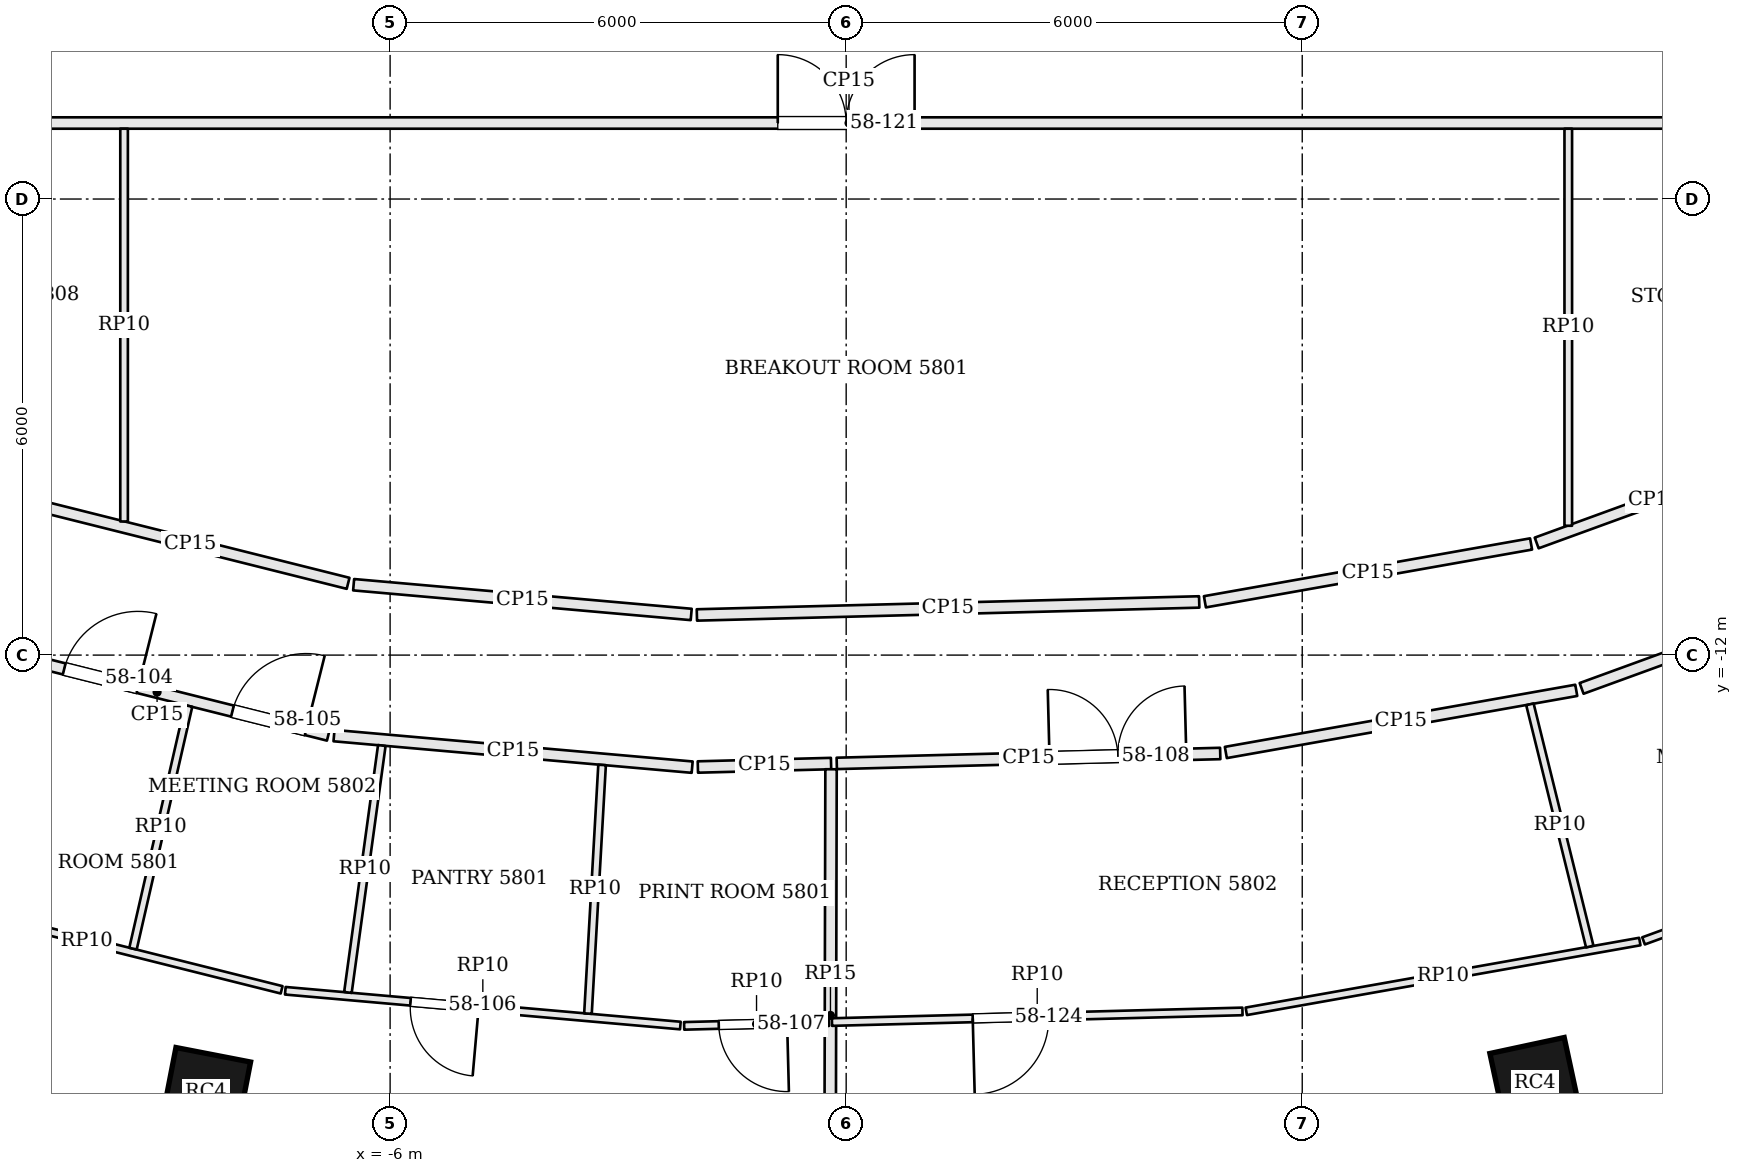
"""IFC4 building model, lengths in metres.
Left out: names, types, materials, properties, quantities, classifications, styles, units other than length and angle.
Written with IfcOpenShell. Run it as: python <this file> out.ifc"""

import sys

from ifc_helpers import new_model, si_unit, direction, frame, frame_2d, origin, origin_2d, place, context, subcontext, project, spatial, rectangle, extrude, element, fill, save


model = new_model("IFC4")
c1 = context("Model", 3, precision=1e-05, world=origin(), true_north=direction((0.0, 1.0)))
c2 = subcontext(c1, "Body", "Model", "MODEL_VIEW")
j1 = project(units=[si_unit("LENGTHUNIT", "METRE"), si_unit("PLANEANGLEUNIT", "RADIAN")], contexts=[c1])
p1 = place(None, origin())
s1 = spatial("IfcSite", under=j1, at=p1, CompositionType="ELEMENT")
p2 = place(p1, origin())
s2 = spatial("IfcBuilding", under=s1, at=p2, CompositionType="ELEMENT")
p3 = place(p2, frame((0.0, 0.0, 237.0)))
s3 = spatial("IfcBuildingStorey", under=s2, at=p3, CompositionType="ELEMENT", Elevation=237.0)
for number, where, z_axis, x_axis in (
    (1, (-8.422, -17.749, 0.0), (0.0, 0.0, 1.0), (0.982, -0.191, 0.0)),
    (2, (9.063, -17.625, 0.0), (0.0, 0.0, 1.0), (0.978, 0.21, 0.0)),
):
    element("IfcColumn", number, at=place(p3, frame(where, z_axis=z_axis, x_axis=x_axis)), inside=s3, PredefinedType="COLUMN", context=c2, shape_type="SweptSolid", body=[
        extrude(rectangle(XDim=1.0, YDim=1.0, at=origin_2d()), origin(), (0.0, 0.0, 1.0), 3.9),
    ])
p4 = place(p3, frame((-11.319, -11.923, 0.0), z_axis=(0.0, 0.0, 1.0), x_axis=(0.969990815038, -0.243141561114, 0.0)))
e3 = element("IfcWall", 3, at=p4, inside=s3, PredefinedType="PARTITIONING", context=c2, shape_type="SweptSolid", body=[
    extrude(rectangle(XDim=4.645, YDim=0.15, at=frame_2d((2.323, 0.0))), origin(), (0.0, 0.0, 1.0), 3.084),
])
p5 = place(p4, frame((1.063, 0.0, 0.0)))
e4 = element("IfcOpeningElement", 4, at=p5, cuts=e3, PredefinedType="OPENING", context=c2, shape_type="SweptSolid", body=[
    extrude(rectangle(XDim=1.0, YDim=2.4, at=frame_2d((0.5, 1.2))), frame((0.0, 0.085, 0.0), z_axis=(0.0, -1.0, 0.0), x_axis=(1.0, 0.0, 0.0)), (0.0, 0.0, 1.0), 0.17),
])
p6 = place(p4, frame((3.345, 0.0, 0.0)))
e5 = element("IfcOpeningElement", 5, at=p6, cuts=e3, PredefinedType="OPENING", context=c2, shape_type="SweptSolid", body=[
    extrude(rectangle(XDim=1.0, YDim=2.4, at=frame_2d((0.5, 1.2))), frame((0.0, 0.085, 0.0), z_axis=(0.0, -1.0, 0.0), x_axis=(1.0, 0.0, 0.0)), (0.0, 0.0, 1.0), 0.17),
])
p7 = place(p3, frame((-6.738, -13.059, 0.0), z_axis=(0.0, 0.0, 1.0), x_axis=(0.996143527037, -0.087738666181, 0.0)))
e6 = element("IfcWall", 6, at=p7, inside=s3, PredefinedType="PARTITIONING", context=c2, shape_type="SweptSolid", body=[
    extrude(rectangle(XDim=4.73, YDim=0.15, at=frame_2d((2.365, 0.0))), origin(), (0.0, 0.0, 1.0), 3.084),
])
p8 = place(p3, frame((-1.951, -13.472, 0.0), z_axis=(0.0, 0.0, 1.0), x_axis=(0.999660729369, 0.026046615075, 0.0)))
e7 = element("IfcWall", 7, at=p8, inside=s3, PredefinedType="PARTITIONING", context=c2, shape_type="SweptSolid", body=[
    extrude(rectangle(XDim=1.753, YDim=0.15, at=frame_2d((0.876, 0.0))), origin(), (0.0, 0.0, 1.0), 3.084),
])
p9 = place(p3, frame((-0.214, -19.979, 0.0), z_axis=(0.0, 0.0, 1.0), x_axis=(0.002336970626, 0.99999726928, 0.0)))
e8 = element("IfcWall", 8, at=p9, inside=s3, PredefinedType="PARTITIONING", context=c2, shape_type="SweptSolid", body=[
    extrude(rectangle(XDim=6.477, YDim=0.15, at=frame_2d((3.239, 0.0))), origin(), (0.0, 0.0, 1.0), 3.184),
])
p10 = place(p3, frame((-0.124, -13.425, 0.0), z_axis=(0.0, 0.0, 1.0), x_axis=(0.999665011025, 0.025881764465, 0.0)))
e9 = element("IfcWall", 9, at=p10, inside=s3, PredefinedType="PARTITIONING", context=c2, shape_type="SweptSolid", body=[
    extrude(rectangle(XDim=5.047, YDim=0.15, at=frame_2d((2.523, 0.0))), origin(), (0.0, 0.0, 1.0), 3.084),
])
p11 = place(p10, frame((2.8, 0.0, 0.0)))
e10 = element("IfcOpeningElement", 10, at=p11, cuts=e9, PredefinedType="OPENING", context=c2, shape_type="SweptSolid", body=[
    extrude(rectangle(XDim=1.8, YDim=2.1, at=frame_2d((0.9, 1.05))), frame((0.0, 0.085, 0.0), z_axis=(0.0, -1.0, 0.0), x_axis=(1.0, 0.0, 0.0)), (0.0, 0.0, 1.0), 0.17),
])
p12 = place(p3, frame((4.995, -13.281, 0.0), z_axis=(0.0, 0.0, 1.0), x_axis=(0.98463411377, 0.174630071865, 0.0)))
e11 = element("IfcWall", 11, at=p12, inside=s3, PredefinedType="PARTITIONING", context=c2, shape_type="SweptSolid", body=[
    extrude(rectangle(XDim=4.682, YDim=0.15, at=frame_2d((2.341, 0.0))), origin(), (0.0, 0.0, 1.0), 3.084),
])
p13 = place(p3, frame((9.676, -12.438, 0.0), z_axis=(0.0, 0.0, 1.0), x_axis=(0.939640289748, 0.342163887461, 0.0)))
e12 = element("IfcWall", 12, at=p13, inside=s3, PredefinedType="PARTITIONING", context=c2, shape_type="SweptSolid", body=[
    extrude(rectangle(XDim=3.68, YDim=0.15, at=frame_2d((1.84, 0.0))), origin(), (0.0, 0.0, 1.0), 3.084),
])
p14 = place(p13, frame((1.349, 0.0, 0.0)))
e13 = element("IfcOpeningElement", 13, at=p14, cuts=e12, PredefinedType="OPENING", context=c2, shape_type="SweptSolid", body=[
    extrude(rectangle(XDim=1.0, YDim=2.4, at=frame_2d((0.5, 1.2))), frame((0.0, 0.085, 0.0), z_axis=(0.0, -1.0, 0.0), x_axis=(1.0, 0.0, 0.0)), (0.0, 0.0, 1.0), 0.17),
])
p15 = place(p3, frame((12.178, -9.398, 0.0), z_axis=(0.0, 0.0, 1.0), x_axis=(-0.939609240084, -0.342249143093, 0.0)))
e14 = element("IfcWall", 14, at=p15, inside=s3, PredefinedType="PARTITIONING", context=c2, shape_type="SweptSolid", body=[
    extrude(rectangle(XDim=3.292, YDim=0.15, at=frame_2d((1.646, 0.0))), origin(), (0.0, 0.0, 1.0), 3.084),
])
p16 = place(p3, frame((9.01, -10.538, 0.0), z_axis=(0.0, 0.0, 1.0), x_axis=(-0.984645638575, -0.174565077936, 0.0)))
e15 = element("IfcWall", 15, at=p16, inside=s3, PredefinedType="PARTITIONING", context=c2, shape_type="SweptSolid", body=[
    extrude(rectangle(XDim=4.358, YDim=0.15, at=frame_2d((2.179, 0.0))), origin(), (0.0, 0.0, 1.0), 3.084),
])
p17 = place(p3, frame((4.645, -11.301, 0.0), z_axis=(0.0, 0.0, 1.0), x_axis=(-0.9996648469, -0.02588810291, 0.0)))
e16 = element("IfcWall", 16, at=p17, inside=s3, PredefinedType="PARTITIONING", context=c2, shape_type="SweptSolid", body=[
    extrude(rectangle(XDim=6.611, YDim=0.15, at=frame_2d((3.305, 0.0))), origin(), (0.0, 0.0, 1.0), 3.084),
])
p18 = place(p3, frame((-2.039, -11.465, 0.0), z_axis=(0.0, 0.0, 1.0), x_axis=(-0.996139855484, 0.087780341286, 0.0)))
e17 = element("IfcWall", 17, at=p18, inside=s3, PredefinedType="PARTITIONING", context=c2, shape_type="SweptSolid", body=[
    extrude(rectangle(XDim=4.458, YDim=0.15, at=frame_2d((2.229, 0.0))), origin(), (0.0, 0.0, 1.0), 3.084),
])
p19 = place(p3, frame((-6.553, -11.056, 0.0), z_axis=(0.0, 0.0, 1.0), x_axis=(-0.970004917182, 0.243085294995, 0.0)))
e18 = element("IfcWall", 18, at=p19, inside=s3, PredefinedType="PARTITIONING", context=c2, shape_type="SweptSolid", body=[
    extrude(rectangle(XDim=4.284, YDim=0.15, at=frame_2d((2.142, 0.0))), origin(), (0.0, 0.0, 1.0), 3.084),
])
p20 = place(p3, frame((-14.925, -5.0, 0.0), z_axis=(0.0, 0.0, 1.0), x_axis=(1.0, 0.0, 0.0)))
e19 = element("IfcWall", 19, at=p20, inside=s3, PredefinedType="PARTITIONING", context=c2, shape_type="SweptSolid", body=[
    extrude(rectangle(XDim=29.925, YDim=0.15, at=frame_2d((14.962, 0.0))), origin(), (0.0, 0.0, 1.0), 3.084),
])
p21 = place(p20, frame((2.175, 0.0, 0.0)))
e20 = element("IfcOpeningElement", 20, at=p21, cuts=e19, PredefinedType="OPENING", context=c2, shape_type="SweptSolid", body=[
    extrude(rectangle(XDim=1.0, YDim=2.4, at=frame_2d((0.5, 1.2))), frame((0.0, 0.085, 0.0), z_axis=(0.0, -1.0, 0.0), x_axis=(1.0, 0.0, 0.0)), (0.0, 0.0, 1.0), 0.17),
])
p22 = place(p20, frame((14.025, 0.0, 0.0)))
e21 = element("IfcOpeningElement", 21, at=p22, cuts=e19, PredefinedType="OPENING", context=c2, shape_type="SweptSolid", body=[
    extrude(rectangle(XDim=1.8, YDim=2.1, at=frame_2d((0.9, 1.05))), frame((0.0, 0.085, 0.0), z_axis=(0.0, -1.0, 0.0), x_axis=(1.0, 0.0, 0.0)), (0.0, 0.0, 1.0), 0.17),
])
p23 = place(p20, frame((26.825, 0.0, 0.0)))
e22 = element("IfcOpeningElement", 22, at=p23, cuts=e19, PredefinedType="OPENING", context=c2, shape_type="SweptSolid", body=[
    extrude(rectangle(XDim=0.7, YDim=2.1, at=frame_2d((0.35, 1.05))), frame((0.0, 0.085, 0.0), z_axis=(0.0, -1.0, 0.0), x_axis=(1.0, 0.0, 0.0)), (0.0, 0.0, 1.0), 0.17),
])
p24 = place(p3, frame((-0.227, -16.829, 0.0), z_axis=(0.0, 0.0, 1.0), x_axis=(-0.99966500172, -0.025882123859, 0.0)))
e23 = element("IfcWall", 23, at=p24, inside=s3, PredefinedType="PARTITIONING", context=c2, shape_type="SweptSolid", body=[
    extrude(rectangle(XDim=1.906, YDim=0.1, at=frame_2d((0.953, 0.0))), origin(), (0.0, 0.0, 1.0), 3.084),
])
p25 = place(p24, frame((0.55, 0.0, 0.0)))
e24 = element("IfcOpeningElement", 24, at=p25, cuts=e23, PredefinedType="OPENING", context=c2, shape_type="SweptSolid", body=[
    extrude(rectangle(XDim=0.9, YDim=2.1, at=frame_2d((0.45, 1.05))), frame((0.0, 0.06, 0.0), z_axis=(0.0, -1.0, 0.0), x_axis=(1.0, 0.0, 0.0)), (0.0, 0.0, 1.0), 0.12),
])
p26 = place(p3, frame((-2.181, -16.874, 0.0), z_axis=(0.0, 0.0, 1.0), x_axis=(-0.996143934904, 0.087734035321, 0.0)))
e25 = element("IfcWall", 25, at=p26, inside=s3, PredefinedType="PARTITIONING", context=c2, shape_type="SweptSolid", body=[
    extrude(rectangle(XDim=5.218, YDim=0.1, at=frame_2d((2.609, 0.0))), origin(), (0.0, 0.0, 1.0), 3.084),
])
p27 = place(p26, frame((2.664, 0.0, 0.0)))
e26 = element("IfcOpeningElement", 26, at=p27, cuts=e25, PredefinedType="OPENING", context=c2, shape_type="SweptSolid", body=[
    extrude(rectangle(XDim=0.9, YDim=2.1, at=frame_2d((0.45, 1.05))), frame((0.0, 0.06, 0.0), z_axis=(0.0, -1.0, 0.0), x_axis=(1.0, 0.0, 0.0)), (0.0, 0.0, 1.0), 0.12),
])
p28 = place(p3, frame((-7.427, -16.404, 0.0), z_axis=(0.0, 0.0, 1.0), x_axis=(-0.970009158253, 0.243068370845, 0.0)))
e27 = element("IfcWall", 27, at=p28, inside=s3, PredefinedType="PARTITIONING", context=c2, shape_type="SweptSolid", body=[
    extrude(rectangle(XDim=5.283, YDim=0.1, at=frame_2d((2.642, 0.0))), origin(), (0.0, 0.0, 1.0), 3.084),
])
p29 = place(p3, frame((-8.652, -12.669, 0.0), z_axis=(0.0, 0.0, 1.0), x_axis=(-0.223144536662, -0.974785369073, 0.0)))
e28 = element("IfcWall", 28, at=p29, inside=s3, PredefinedType="PARTITIONING", context=c2, shape_type="SweptSolid", body=[
    extrude(rectangle(XDim=3.276, YDim=0.1, at=frame_2d((1.638, 0.0))), origin(), (0.0, 0.0, 1.0), 3.084),
])
p30 = place(p3, frame((-6.109, -13.19, 0.0), z_axis=(0.0, 0.0, 1.0), x_axis=(-0.135957093791, -0.990714726169, 0.0)))
e29 = element("IfcWall", 29, at=p30, inside=s3, PredefinedType="PARTITIONING", context=c2, shape_type="SweptSolid", body=[
    extrude(rectangle(XDim=3.279, YDim=0.1, at=frame_2d((1.64, 0.0))), origin(), (0.0, 0.0, 1.0), 3.084),
])
p31 = place(p3, frame((-3.211, -13.445, 0.0), z_axis=(0.0, 0.0, 1.0), x_axis=(-0.056703901856, -0.99839103938, 0.0)))
e30 = element("IfcWall", 30, at=p31, inside=s3, PredefinedType="PARTITIONING", context=c2, shape_type="SweptSolid", body=[
    extrude(rectangle(XDim=3.277, YDim=0.1, at=frame_2d((1.638, 0.0))), origin(), (0.0, 0.0, 1.0), 3.084),
])
p32 = place(p3, frame((14.59, -14.267, 0.0), z_axis=(0.0, 0.0, 1.0), x_axis=(-0.939623405418, -0.342210251148, 0.0)))
e31 = element("IfcWall", 31, at=p32, inside=s3, PredefinedType="PARTITIONING", context=c2, shape_type="SweptSolid", body=[
    extrude(rectangle(XDim=4.363, YDim=0.1, at=frame_2d((2.182, 0.0))), origin(), (0.0, 0.0, 1.0), 3.084),
])
p33 = place(p3, frame((10.441, -15.769, 0.0), z_axis=(0.0, 0.0, 1.0), x_axis=(-0.984642067447, -0.174585219919, 0.0)))
e32 = element("IfcWall", 32, at=p33, inside=s3, PredefinedType="PARTITIONING", context=c2, shape_type="SweptSolid", body=[
    extrude(rectangle(XDim=5.258, YDim=0.1, at=frame_2d((2.629, 0.0))), origin(), (0.0, 0.0, 1.0), 3.084),
])
p34 = place(p3, frame((5.214, -16.688, 0.0), z_axis=(0.0, 0.0, 1.0), x_axis=(-0.999664716631, -0.025893132747, 0.0)))
e33 = element("IfcWall", 33, at=p34, inside=s3, PredefinedType="PARTITIONING", context=c2, shape_type="SweptSolid", body=[
    extrude(rectangle(XDim=5.403, YDim=0.1, at=frame_2d((2.701, 0.0))), origin(), (0.0, 0.0, 1.0), 3.084),
])
p35 = place(p34, frame((2.55, 0.0, 0.0)))
e34 = element("IfcOpeningElement", 34, at=p35, cuts=e33, PredefinedType="OPENING", context=c2, shape_type="SweptSolid", body=[
    extrude(rectangle(XDim=1.0, YDim=2.1, at=frame_2d((0.5, 1.05))), frame((0.0, 0.06, 0.0), z_axis=(0.0, -1.0, 0.0), x_axis=(1.0, 0.0, 0.0)), (0.0, 0.0, 1.0), 0.12),
])
p36 = place(p3, frame((8.995, -12.648, 0.0), z_axis=(0.0, 0.0, 1.0), x_axis=(0.239839908092, -0.970812452787, 0.0)))
e35 = element("IfcWall", 35, at=p36, inside=s3, PredefinedType="PARTITIONING", context=c2, shape_type="SweptSolid", body=[
    extrude(rectangle(XDim=3.283, YDim=0.1, at=frame_2d((1.641, 0.0))), origin(), (0.0, 0.0, 1.0), 3.084),
])
p37 = place(p3, frame((-9.5, -10.242, 0.0), z_axis=(0.0, 0.0, 1.0), x_axis=(0.0, 1.0, 0.0)))
e36 = element("IfcWall", 36, at=p37, inside=s3, PredefinedType="PARTITIONING", context=c2, shape_type="SweptSolid", body=[
    extrude(rectangle(XDim=5.167, YDim=0.1, at=frame_2d((2.583, 0.0))), origin(), (0.0, 0.0, 1.0), 3.084),
])
p38 = place(p3, frame((9.5, -10.299, 0.0), z_axis=(0.0, 0.0, 1.0), x_axis=(0.0, 1.0, 0.0)))
e37 = element("IfcWall", 37, at=p38, inside=s3, PredefinedType="PARTITIONING", context=c2, shape_type="SweptSolid", body=[
    extrude(rectangle(XDim=5.224, YDim=0.1, at=frame_2d((2.612, 0.0))), origin(), (0.0, 0.0, 1.0), 3.084),
])
p39 = place(p5, origin())
e38 = element("IfcDoor", 38, at=p39, inside=s3, OperationType="SINGLE_SWING_RIGHT", PredefinedType="DOOR", context=c2, shape_type="SweptSolid", body=[
    extrude(rectangle(XDim=1.0, YDim=2.4, at=frame_2d((0.5, 1.2))), frame((0.0, 0.025, 0.0), z_axis=(0.0, -1.0, 0.0), x_axis=(1.0, 0.0, 0.0)), (0.0, 0.0, 1.0), 0.05),
])
fill(e4, e38)
p40 = place(p6, origin())
e39 = element("IfcDoor", 39, at=p40, inside=s3, OperationType="SINGLE_SWING_RIGHT", PredefinedType="DOOR", context=c2, shape_type="SweptSolid", body=[
    extrude(rectangle(XDim=1.0, YDim=2.4, at=frame_2d((0.5, 1.2))), frame((0.0, 0.025, 0.0), z_axis=(0.0, -1.0, 0.0), x_axis=(1.0, 0.0, 0.0)), (0.0, 0.0, 1.0), 0.05),
])
fill(e5, e39)
p41 = place(p27, origin())
e40 = element("IfcDoor", 40, at=p41, inside=s3, OperationType="SINGLE_SWING_LEFT", PredefinedType="DOOR", context=c2, shape_type="SweptSolid", body=[
    extrude(rectangle(XDim=0.9, YDim=2.1, at=frame_2d((0.45, 1.05))), frame((0.0, 0.025, 0.0), z_axis=(0.0, -1.0, 0.0), x_axis=(1.0, 0.0, 0.0)), (0.0, 0.0, 1.0), 0.05),
])
fill(e26, e40)
p42 = place(p25, origin())
e41 = element("IfcDoor", 41, at=p42, inside=s3, OperationType="SINGLE_SWING_LEFT", PredefinedType="DOOR", context=c2, shape_type="SweptSolid", body=[
    extrude(rectangle(XDim=0.9, YDim=2.1, at=frame_2d((0.45, 1.05))), frame((0.0, 0.025, 0.0), z_axis=(0.0, -1.0, 0.0), x_axis=(1.0, 0.0, 0.0)), (0.0, 0.0, 1.0), 0.05),
])
fill(e24, e41)
p43 = place(p11, origin())
e42 = element("IfcDoor", 42, at=p43, inside=s3, OperationType="DOUBLE_DOOR_SINGLE_SWING", PredefinedType="DOOR", context=c2, shape_type="SweptSolid", body=[
    extrude(rectangle(XDim=1.8, YDim=2.1, at=frame_2d((0.9, 1.05))), frame((0.0, 0.025, 0.0), z_axis=(0.0, -1.0, 0.0), x_axis=(1.0, 0.0, 0.0)), (0.0, 0.0, 1.0), 0.05),
])
fill(e10, e42)
p44 = place(p22, origin())
e43 = element("IfcDoor", 43, at=p44, inside=s3, OperationType="DOUBLE_DOOR_SINGLE_SWING", PredefinedType="DOOR", context=c2, shape_type="SweptSolid", body=[
    extrude(rectangle(XDim=1.8, YDim=2.1, at=frame_2d((0.9, 1.05))), frame((0.0, 0.025, 0.0), z_axis=(0.0, -1.0, 0.0), x_axis=(1.0, 0.0, 0.0)), (0.0, 0.0, 1.0), 0.05),
])
fill(e21, e43)
p45 = place(p35, origin())
e44 = element("IfcDoor", 44, at=p45, inside=s3, OperationType="SINGLE_SWING_RIGHT", PredefinedType="DOOR", context=c2, shape_type="SweptSolid", body=[
    extrude(rectangle(XDim=1.0, YDim=2.1, at=frame_2d((0.5, 1.05))), frame((0.0, 0.025, 0.0), z_axis=(0.0, -1.0, 0.0), x_axis=(1.0, 0.0, 0.0)), (0.0, 0.0, 1.0), 0.05),
])
fill(e34, e44)
save(model, sys.argv[1])
